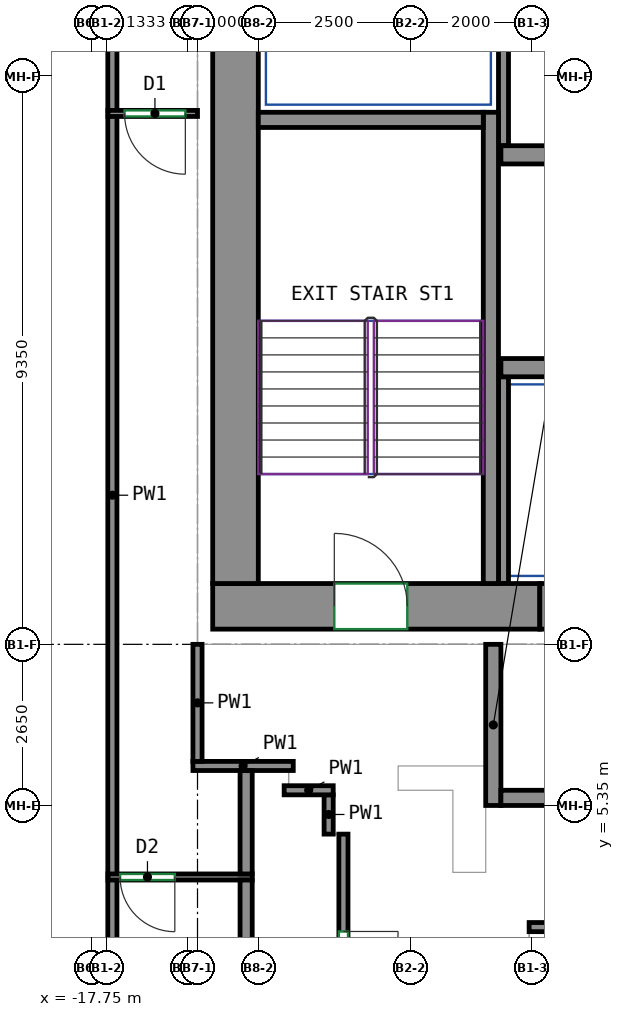
"""IFC4 building model, lengths in metres.
Left out: names, types, materials, properties, quantities, classifications, styles, units other than length and angle.
Written with IfcOpenShell. Run it as: python <this file> out.ifc"""

import sys

from ifc_helpers import new_model, si_unit, direction, frame, frame_2d, origin, place, context, subcontext, project, spatial, rectangle, extrude, source, transform, mapped, element, fill, save


model = new_model("IFC4")
c1 = context("Model", 3, precision=1e-05, world=origin(), true_north=direction((0.0, 1.0)))
c2 = subcontext(c1, "Body", "Model", "MODEL_VIEW")
j1 = project(units=[si_unit("LENGTHUNIT", "METRE"), si_unit("PLANEANGLEUNIT", "RADIAN")], contexts=[c1])
p1 = place(None, origin())
s1 = spatial("IfcSite", under=j1, at=p1, CompositionType="ELEMENT")
p2 = place(p1, origin())
s2 = spatial("IfcBuilding", under=s1, at=p2, CompositionType="ELEMENT")
p3 = place(p2, frame((0.0, 0.0, 242.4)))
s3 = spatial("IfcBuildingStorey", under=s2, at=p3, CompositionType="ELEMENT", Elevation=242.4)
m1 = source(origin(), c2, "Body", "SweptSolid", [
    extrude(rectangle(XDim=5.38, YDim=0.75, at=frame_2d((2.69, 0.0))), origin(), (0.0, 0.0, 1.0), 3.12),
])
p4 = place(p3, frame((-15.75, 8.625, 0.0), z_axis=(0.0, 0.0, 1.0), x_axis=(1.0, 0.0, 0.0)))
e1 = element("IfcWall", 1, at=p4, inside=s3, PredefinedType="SHEAR", context=c2, shape_type="MappedRepresentation", body=[
    mapped(m1, transform((0.0, 0.0, 0.0))),
])
p5 = place(p4, frame((2.0, 0.0, 0.0)))
e2 = element("IfcOpeningElement", 2, at=p5, cuts=e1, PredefinedType="OPENING", context=c2, shape_type="SweptSolid", body=[
    extrude(rectangle(XDim=1.2, YDim=2.1, at=frame_2d((0.6, 1.05))), frame((0.0, 0.385, 0.0), z_axis=(0.0, -1.0, 0.0), x_axis=(1.0, 0.0, 0.0)), (0.0, 0.0, 1.0), 0.77),
])
m2 = source(origin(), c2, "Body", "SweptSolid", [
    extrude(rectangle(XDim=12.0, YDim=0.75, at=frame_2d((6.0, 0.0))), origin(), (0.0, 0.0, 1.0), 3.12),
])
p6 = place(p3, frame((-15.375, 9.0, 0.0), z_axis=(0.0, 0.0, 1.0), x_axis=(0.0, 1.0, 0.0)))
e3 = element("IfcWall", 3, at=p6, inside=s3, PredefinedType="SHEAR", context=c2, shape_type="MappedRepresentation", body=[
    mapped(m2, transform((0.0, 0.0, 0.0))),
])
m3 = source(origin(), c2, "Body", "SweptSolid", [
    extrude(rectangle(XDim=7.75, YDim=0.25, at=frame_2d((3.875, 0.0))), origin(), (0.0, 0.0, 1.0), 3.12),
])
p7 = place(p3, frame((-11.175, 9.0, 0.0), z_axis=(0.0, 0.0, 1.0), x_axis=(0.0, 1.0, 0.0)))
e4 = element("IfcWall", 4, at=p7, inside=s3, PredefinedType="SHEAR", context=c2, shape_type="MappedRepresentation", body=[
    mapped(m3, transform((0.0, 0.0, 0.0))),
])
m4 = source(origin(), c2, "Body", "SweptSolid", [
    extrude(rectangle(XDim=3.7, YDim=0.25, at=frame_2d((1.85, 0.0))), origin(), (0.0, 0.0, 1.0), 3.12),
])
p8 = place(p3, frame((-15.0, 16.625, 0.0), z_axis=(0.0, 0.0, 1.0), x_axis=(1.0, 0.0, 0.0)))
e5 = element("IfcWall", 5, at=p8, inside=s3, PredefinedType="SHEAR", context=c2, shape_type="MappedRepresentation", body=[
    mapped(m4, transform((0.0, 0.0, 0.0))),
])
m5 = source(origin(), c2, "Body", "SweptSolid", [
    extrude(rectangle(XDim=6.0, YDim=0.3, at=frame_2d((3.0, 0.0))), origin(), (0.0, 0.0, 1.0), 3.12),
])
p9 = place(p3, frame((-11.01, 12.55, 0.0), z_axis=(0.0, 0.0, 1.0), x_axis=(1.0, 0.0, 0.0)))
e6 = element("IfcWall", 6, at=p9, inside=s3, PredefinedType="SHEAR", context=c2, shape_type="MappedRepresentation", body=[
    mapped(m5, transform((0.0, 0.0, 0.0))),
])
m6 = source(origin(), c2, "Body", "SweptSolid", [
    extrude(rectangle(XDim=22.08, YDim=0.3, at=frame_2d((11.04, 0.0))), origin(), (0.0, 0.0, 1.0), 3.12),
])
p10 = place(p3, frame((-11.01, 16.05, 0.0), z_axis=(0.0, 0.0, 1.0), x_axis=(1.0, 0.0, 0.0)))
e7 = element("IfcWall", 7, at=p10, inside=s3, PredefinedType="SHEAR", context=c2, shape_type="MappedRepresentation", body=[
    mapped(m6, transform((0.0, 0.0, 0.0))),
])
m7 = source(origin(), c2, "Body", "SweptSolid", [
    extrude(rectangle(XDim=2.65, YDim=0.25, at=frame_2d((1.325, 0.0))), origin(), (0.0, 0.0, 1.0), 2.57),
])
p11 = place(p3, frame((-11.135, 5.35, 0.0), z_axis=(0.0, 0.0, 1.0), x_axis=(0.0, 1.0, 0.0)))
e8 = element("IfcWall", 8, at=p11, inside=s3, PredefinedType="PARTITIONING", context=c2, shape_type="MappedRepresentation", body=[
    mapped(m7, transform((0.0, 0.0, 0.0))),
])
m8 = source(origin(), c2, "Body", "SweptSolid", [
    extrude(rectangle(XDim=5.36, YDim=0.25, at=frame_2d((2.68, 0.0))), origin(), (0.0, 0.0, 1.0), 3.12),
])
p12 = place(p3, frame((-11.01, 5.475, 0.0), z_axis=(0.0, 0.0, 1.0), x_axis=(1.0, 0.0, 0.0)))
e9 = element("IfcWall", 9, at=p12, inside=s3, PredefinedType="PARTITIONING", context=c2, shape_type="MappedRepresentation", body=[
    mapped(m8, transform((0.0, 0.0, 0.0))),
])
p13 = place(p12, frame((2.28, 0.0, 0.0)))
e10 = element("IfcOpeningElement", 10, at=p13, cuts=e9, PredefinedType="OPENING", context=c2, shape_type="SweptSolid", body=[
    extrude(rectangle(XDim=0.8, YDim=2.0, at=frame_2d((0.4, 1.0))), frame((0.0, 0.135, 0.0), z_axis=(0.0, -1.0, 0.0), x_axis=(1.0, 0.0, 0.0)), (0.0, 0.0, 1.0), 0.27),
])
m9 = source(origin(), c2, "Body", "SweptSolid", [
    extrude(rectangle(XDim=4.8, YDim=0.165, at=frame_2d((2.4, 0.0))), origin(), (0.0, 0.0, 1.0), 3.12),
])
p14 = place(p3, frame((-10.968, 16.2, 0.0), z_axis=(0.0, 0.0, 1.0), x_axis=(0.0, 1.0, 0.0)))
e11 = element("IfcWall", 11, at=p14, inside=s3, PredefinedType="PARTITIONING", context=c2, shape_type="MappedRepresentation", body=[
    mapped(m9, transform((0.0, 0.0, 0.0))),
])
m10 = source(origin(), c2, "Body", "SweptSolid", [
    extrude(rectangle(XDim=3.4, YDim=0.165, at=frame_2d((1.7, 0.0))), origin(), (0.0, 0.0, 1.0), 3.12),
])
p15 = place(p3, frame((-10.968, 9.0, 0.0), z_axis=(0.0, 0.0, 1.0), x_axis=(0.0, 1.0, 0.0)))
e12 = element("IfcWall", 12, at=p15, inside=s3, PredefinedType="PARTITIONING", context=c2, shape_type="MappedRepresentation", body=[
    mapped(m10, transform((0.0, 0.0, 0.0))),
])
m11 = source(origin(), c2, "Body", "SweptSolid", [
    extrude(rectangle(XDim=1.4, YDim=0.75, at=frame_2d((0.7, 0.0))), origin(), (0.0, 0.0, 1.0), 2.7),
])
p16 = place(p3, frame((-10.37, 8.625, 0.0), z_axis=(0.0, 0.0, 1.0), x_axis=(1.0, 0.0, 0.0)))
e13 = element("IfcWall", 13, at=p16, inside=s3, PredefinedType="PARTITIONING", context=c2, shape_type="MappedRepresentation", body=[
    mapped(m11, transform((0.0, 0.0, 0.0))),
])
p17 = place(p16, frame((0.25, 0.0, 0.0)))
e14 = element("IfcOpeningElement", 14, at=p17, cuts=e13, PredefinedType="OPENING", context=c2, shape_type="SweptSolid", body=[
    extrude(rectangle(XDim=0.9, YDim=2.1, at=frame_2d((0.45, 1.05))), frame((0.0, 0.385, 0.0), z_axis=(0.0, -1.0, 0.0), x_axis=(1.0, 0.0, 0.0)), (0.0, 0.0, 1.0), 0.77),
])
p18 = place(p3, frame((-17.4, -1.791, 0.0), z_axis=(0.0, 0.0, 1.0), x_axis=(0.0, 1.0, 0.0)))
e15 = element("IfcWall", 15, at=p18, inside=s3, PredefinedType="PARTITIONING", context=c2, shape_type="SweptSolid", body=[
    extrude(rectangle(XDim=5.925, YDim=0.15, at=frame_2d((2.962, 0.0))), origin(), (0.0, 0.0, 1.0), 3.12),
])
p19 = place(p3, frame((-17.4, 4.214, 0.0), z_axis=(0.0, 0.0, 1.0), x_axis=(0.0, 1.0, 0.0)))
e16 = element("IfcWall", 16, at=p19, inside=s3, PredefinedType="PARTITIONING", context=c2, shape_type="SweptSolid", body=[
    extrude(rectangle(XDim=12.477, YDim=0.15, at=frame_2d((6.238, 0.0))), origin(), (0.0, 0.0, 1.0), 3.12),
])
p20 = place(p3, frame((-16.075, 6.0, 0.0), z_axis=(0.0, 0.0, 1.0), x_axis=(1.0, 0.0, 0.0)))
e17 = element("IfcWall", 17, at=p20, inside=s3, PredefinedType="PARTITIONING", context=c2, shape_type="SweptSolid", body=[
    extrude(rectangle(XDim=1.65, YDim=0.15, at=frame_2d((0.825, 0.0))), origin(), (0.0, 0.0, 1.0), 3.12),
])
p21 = place(p3, frame((-16.0, 6.075, 0.0), z_axis=(0.0, 0.0, 1.0), x_axis=(0.0, 1.0, 0.0)))
e18 = element("IfcWall", 18, at=p21, inside=s3, PredefinedType="PARTITIONING", context=c2, shape_type="SweptSolid", body=[
    extrude(rectangle(XDim=1.925, YDim=0.15, at=frame_2d((0.962, 0.0))), origin(), (0.0, 0.0, 1.0), 3.12),
])
p22 = place(p3, frame((-17.4, 16.771, 0.0), z_axis=(0.0, 0.0, 1.0), x_axis=(0.0, 1.0, 0.0)))
e19 = element("IfcWall", 19, at=p22, inside=s3, PredefinedType="PARTITIONING", context=c2, shape_type="SweptSolid", body=[
    extrude(rectangle(XDim=4.254, YDim=0.15, at=frame_2d((2.127, 0.0))), origin(), (0.0, 0.0, 1.0), 3.12),
])
p23 = place(p3, frame((-13.6, 4.879, 0.0), z_axis=(0.0, 0.0, 1.0), x_axis=(0.0, -1.0, 0.0)))
e20 = element("IfcWall", 20, at=p23, inside=s3, PredefinedType="PARTITIONING", context=c2, shape_type="SweptSolid", body=[
    extrude(rectangle(XDim=11.004, YDim=0.15, at=frame_2d((5.502, 0.0))), origin(), (0.0, 0.0, 1.0), 3.12),
])
p24 = place(p23, frame((1.601, 0.0, 0.0)))
e21 = element("IfcOpeningElement", 21, at=p24, cuts=e20, PredefinedType="OPENING", context=c2, shape_type="SweptSolid", body=[
    extrude(rectangle(XDim=0.9, YDim=2.1, at=frame_2d((0.45, 1.05))), frame((0.0, 0.085, 0.0), z_axis=(0.0, -1.0, 0.0), x_axis=(1.0, 0.0, 0.0)), (0.0, 0.0, 1.0), 0.17),
])
p25 = place(p3, frame((-13.843, 5.525, 0.0), z_axis=(0.0, 0.0, 1.0), x_axis=(0.0, -1.0, 0.0)))
e22 = element("IfcWall", 22, at=p25, inside=s3, PredefinedType="PARTITIONING", context=c2, shape_type="SweptSolid", body=[
    extrude(rectangle(XDim=0.646, YDim=0.15, at=frame_2d((0.323, 0.0))), origin(), (0.0, 0.0, 1.0), 3.12),
])
p26 = place(p3, frame((-14.575, 5.6, 0.0), z_axis=(0.0, 0.0, 1.0), x_axis=(1.0, 0.0, 0.0)))
e23 = element("IfcWall", 23, at=p26, inside=s3, PredefinedType="PARTITIONING", context=c2, shape_type="SweptSolid", body=[
    extrude(rectangle(XDim=0.807, YDim=0.15, at=frame_2d((0.403, 0.0))), origin(), (0.0, 0.0, 1.0), 3.12),
])
p27 = place(p3, frame((-10.546, 3.35, 0.0), z_axis=(0.0, 0.0, 1.0), x_axis=(1.0, 0.0, 0.0)))
e24 = element("IfcWall", 24, at=p27, inside=s3, PredefinedType="PARTITIONING", context=c2, shape_type="SweptSolid", body=[
    extrude(rectangle(XDim=3.896, YDim=0.15, at=frame_2d((1.948, 0.0))), origin(), (0.0, 0.0, 1.0), 3.12),
])
p28 = place(p3, frame((-15.1, 4.174, 0.0), z_axis=(0.0, 0.0, 1.0), x_axis=(-1.0, 0.0, 0.0)))
e25 = element("IfcWall", 25, at=p28, inside=s3, PredefinedType="PARTITIONING", context=c2, shape_type="SweptSolid", body=[
    extrude(rectangle(XDim=2.373, YDim=0.1, at=frame_2d((1.187, 0.0))), origin(), (0.0, 0.0, 1.0), 3.12),
])
p29 = place(p28, frame((1.273, 0.0, 0.0)))
e26 = element("IfcOpeningElement", 26, at=p29, cuts=e25, PredefinedType="OPENING", context=c2, shape_type="SweptSolid", body=[
    extrude(rectangle(XDim=0.9, YDim=2.1, at=frame_2d((0.45, 1.05))), frame((0.0, 0.06, 0.0), z_axis=(0.0, -1.0, 0.0), x_axis=(1.0, 0.0, 0.0)), (0.0, 0.0, 1.0), 0.12),
])
p30 = place(p3, frame((-15.2, -1.781, 0.0), z_axis=(0.0, 0.0, 1.0), x_axis=(0.0, 1.0, 0.0)))
e27 = element("IfcWall", 27, at=p30, inside=s3, PredefinedType="PARTITIONING", context=c2, shape_type="SweptSolid", body=[
    extrude(rectangle(XDim=5.905, YDim=0.2, at=frame_2d((2.953, 0.0))), origin(), (0.0, 0.0, 1.0), 3.12),
])
p31 = place(p3, frame((-16.0, 16.731, 0.0), z_axis=(0.0, 0.0, 1.0), x_axis=(-1.0, 0.0, 0.0)))
e28 = element("IfcWall", 28, at=p31, inside=s3, PredefinedType="PARTITIONING", context=c2, shape_type="SweptSolid", body=[
    extrude(rectangle(XDim=1.473, YDim=0.1, at=frame_2d((0.736, 0.0))), origin(), (0.0, 0.0, 1.0), 3.12),
])
p32 = place(p31, frame((0.2, 0.0, 0.0)))
e29 = element("IfcOpeningElement", 29, at=p32, cuts=e28, PredefinedType="OPENING", context=c2, shape_type="SweptSolid", body=[
    extrude(rectangle(XDim=1.0, YDim=2.1, at=frame_2d((0.5, 1.05))), frame((0.0, 0.06, 0.0), z_axis=(0.0, -1.0, 0.0), x_axis=(1.0, 0.0, 0.0)), (0.0, 0.0, 1.0), 0.12),
])
p33 = place(p3, frame((-15.2, 4.224, 0.0), z_axis=(0.0, 0.0, 1.0), x_axis=(0.0, 1.0, 0.0)))
e30 = element("IfcWall", 30, at=p33, inside=s3, PredefinedType="PARTITIONING", context=c2, shape_type="SweptSolid", body=[
    extrude(rectangle(XDim=1.699, YDim=0.2, at=frame_2d((0.85, 0.0))), origin(), (0.0, 0.0, 1.0), 3.12),
])
p34 = place(p5, origin())
e31 = element("IfcDoor", 31, at=p34, inside=s3, OperationType="DOUBLE_DOOR_SINGLE_SWING", PredefinedType="DOOR", context=c2, shape_type="SweptSolid", body=[
    extrude(rectangle(XDim=1.2, YDim=2.1, at=frame_2d((0.6, 1.05))), frame((0.0, 0.28, 0.0), z_axis=(0.0, -1.0, 0.0), x_axis=(1.0, 0.0, 0.0)), (0.0, 0.0, 1.0), 0.05),
])
fill(e2, e31)
p35 = place(p24, origin())
e32 = element("IfcDoor", 32, at=p35, inside=s3, OperationType="SINGLE_SWING_LEFT", PredefinedType="DOOR", context=c2, shape_type="SweptSolid", body=[
    extrude(rectangle(XDim=0.9, YDim=2.1, at=frame_2d((0.45, 1.05))), frame((0.0, 0.025, 0.0), z_axis=(0.0, -1.0, 0.0), x_axis=(1.0, 0.0, 0.0)), (0.0, 0.0, 1.0), 0.05),
])
fill(e21, e32)
p36 = place(p29, origin())
e33 = element("IfcDoor", 33, at=p36, inside=s3, OperationType="SINGLE_SWING_LEFT", PredefinedType="DOOR", context=c2, shape_type="SweptSolid", body=[
    extrude(rectangle(XDim=0.9, YDim=2.1, at=frame_2d((0.45, 1.05))), frame((0.0, 0.025, 0.0), z_axis=(0.0, -1.0, 0.0), x_axis=(1.0, 0.0, 0.0)), (0.0, 0.0, 1.0), 0.05),
])
fill(e26, e33)
p37 = place(p32, origin())
e34 = element("IfcDoor", 34, at=p37, inside=s3, OperationType="SINGLE_SWING_LEFT", PredefinedType="DOOR", context=c2, shape_type="SweptSolid", body=[
    extrude(rectangle(XDim=1.0, YDim=2.1, at=frame_2d((0.5, 1.05))), frame((0.0, 0.025, 0.0), z_axis=(0.0, -1.0, 0.0), x_axis=(1.0, 0.0, 0.0)), (0.0, 0.0, 1.0), 0.05),
])
fill(e29, e34)
save(model, sys.argv[1])
